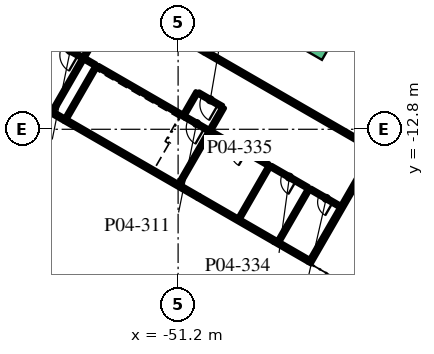
"""IFC4 building model, lengths in metres.
Left out: names, types, materials, properties, quantities, classifications, styles, units other than length and angle.
Written with IfcOpenShell. Run it as: python <this file> out.ifc"""

import sys

from ifc_helpers import new_model, si_unit, direction, frame, frame_2d, origin, place, context, subcontext, project, spatial, rectangle, extrude, element, fill, save


model = new_model("IFC4")
c1 = context("Model", 3, precision=1e-05, world=origin(), true_north=direction((0.0, 1.0)))
c2 = subcontext(c1, "Body", "Model", "MODEL_VIEW")
j1 = project(units=[si_unit("LENGTHUNIT", "METRE"), si_unit("PLANEANGLEUNIT", "RADIAN")], contexts=[c1])
p1 = place(None, origin())
s1 = spatial("IfcSite", under=j1, at=p1, CompositionType="ELEMENT")
p2 = place(p1, origin())
s2 = spatial("IfcBuilding", under=s1, at=p2, CompositionType="ELEMENT")
p3 = place(p2, frame((0.0, 0.0, 21.6)))
s3 = spatial("IfcBuildingStorey", under=s2, at=p3, CompositionType="ELEMENT", Elevation=21.6)
p4 = place(p3, frame((-38.25, -14.145, 0.0), z_axis=(0.0, 0.0, 1.0), x_axis=(-0.499999331568, -0.866025789703, 0.0)))
e1 = element("IfcWall", 1, at=p4, inside=s3, PredefinedType="SOLIDWALL", context=c2, shape_type="SweptSolid", body=[
    extrude(rectangle(XDim=8.625, YDim=0.25, at=frame_2d((4.312, 0.0))), origin(), (0.0, 0.0, 1.0), 4.5),
])
p5 = place(p3, frame((-38.358, -14.083, 0.0), z_axis=(0.0, 0.0, 1.0), x_axis=(-0.866025499775, 0.499999833739, 0.0)))
e2 = element("IfcWall", 2, at=p5, inside=s3, PredefinedType="SOLIDWALL", context=c2, shape_type="SweptSolid", body=[
    extrude(rectangle(XDim=12.8, YDim=0.25, at=frame_2d((6.4, 0.0))), origin(), (0.0, 0.0, 1.0), 4.5),
])
p6 = place(p3, frame((-51.782, -6.333, 0.0), z_axis=(0.0, 0.0, 1.0), x_axis=(0.866019956843, -0.50000943426, 0.0)))
e3 = element("IfcWall", 3, at=p6, inside=s3, PredefinedType="SOLIDWALL", context=c2, shape_type="SweptSolid", body=[
    extrude(rectangle(XDim=2.7, YDim=0.25, at=frame_2d((1.35, 0.0))), origin(), (0.0, 0.0, 1.0), 4.5),
])
p7 = place(p6, frame((0.25, 0.0, 0.0)))
e4 = element("IfcOpeningElement", 4, at=p7, cuts=e3, PredefinedType="OPENING", context=c2, shape_type="SweptSolid", body=[
    extrude(rectangle(XDim=2.2, YDim=2.1, at=frame_2d((1.1, 1.05))), frame((0.0, 0.135, 0.0), z_axis=(0.0, -1.0, 0.0), x_axis=(1.0, 0.0, 0.0)), (0.0, 0.0, 1.0), 0.27),
])
p8 = place(p3, frame((-42.608, -21.444, 0.0), z_axis=(0.0, 0.0, 1.0), x_axis=(-0.866021400173, 0.500006934395, 0.0)))
e5 = element("IfcWall", 5, at=p8, inside=s3, PredefinedType="SOLIDWALL", context=c2, shape_type="SweptSolid", body=[
    extrude(rectangle(XDim=2.6, YDim=0.25, at=frame_2d((1.3, 0.0))), origin(), (0.0, 0.0, 1.0), 4.5),
])
p9 = place(p3, frame((-44.86, -20.144, 0.0), z_axis=(0.0, 0.0, 1.0), x_axis=(-0.866025774745, 0.499999357477, 0.0)))
e6 = element("IfcWall", 6, at=p9, inside=s3, PredefinedType="SOLIDWALL", context=c2, shape_type="SweptSolid", body=[
    extrude(rectangle(XDim=5.775, YDim=0.25, at=frame_2d((2.887, 0.0))), origin(), (0.0, 0.0, 1.0), 4.5),
])
p10 = place(p9, frame((0.25, 0.0, 0.9)))
e7 = element("IfcOpeningElement", 7, at=p10, cuts=e6, PredefinedType="OPENING", context=c2, shape_type="SweptSolid", body=[
    extrude(rectangle(XDim=2.0, YDim=1.8, at=frame_2d((1.0, 0.9))), frame((0.0, 0.135, 0.0), z_axis=(0.0, -1.0, 0.0), x_axis=(1.0, 0.0, 0.0)), (0.0, 0.0, 1.0), 0.27),
])
p11 = place(p9, frame((3.525, 0.0, 0.9)))
e8 = element("IfcOpeningElement", 8, at=p11, cuts=e6, PredefinedType="OPENING", context=c2, shape_type="SweptSolid", body=[
    extrude(rectangle(XDim=2.0, YDim=1.8, at=frame_2d((1.0, 0.9))), frame((0.0, 0.135, 0.0), z_axis=(0.0, -1.0, 0.0), x_axis=(1.0, 0.0, 0.0)), (0.0, 0.0, 1.0), 0.27),
])
p12 = place(p3, frame((-49.861, -17.256, 0.0), z_axis=(0.0, 0.0, 1.0), x_axis=(-0.866026575979, 0.499997969693, 0.0)))
e9 = element("IfcWall", 9, at=p12, inside=s3, PredefinedType="SOLIDWALL", context=c2, shape_type="SweptSolid", body=[
    extrude(rectangle(XDim=10.125, YDim=0.25, at=frame_2d((5.062, 0.0))), origin(), (0.0, 0.0, 1.0), 4.5),
])
p13 = place(p3, frame((-59.496, -11.694, 0.0), z_axis=(0.0, 0.0, 1.0), x_axis=(-0.866021068297, 0.500007509209, 0.0)))
e10 = element("IfcWall", 10, at=p13, inside=s3, PredefinedType="SOLIDWALL", context=c2, shape_type="SweptSolid", body=[
    extrude(rectangle(XDim=8.6, YDim=0.25, at=frame_2d((4.3, 0.0))), origin(), (0.0, 0.0, 1.0), 4.5),
])
p14 = place(p3, frame((-58.63, -12.194, 0.0), z_axis=(0.0, 0.0, 1.0), x_axis=(-0.866010750942, 0.50002537861, 0.0)))
e11 = element("IfcWall", 11, at=p14, inside=s3, PredefinedType="SOLIDWALL", context=c2, shape_type="SweptSolid", body=[
    extrude(rectangle(XDim=1.0, YDim=0.25, at=frame_2d((0.5, 0.0))), origin(), (0.0, 0.0, 1.0), 4.5),
])
for number, where, z_axis, x_axis in (
    (12, (-49.119, -12.921, 0.0), (0.0, 0.0, 1.0), (-0.5, -0.866, 0.0)),
    (13, (-56.567, -8.621, 0.0), (0.0, 0.0, 1.0), (-0.5, -0.866, 0.0)),
    (14, (-57.433, -8.121, 0.0), (0.0, 0.0, 1.0), (-0.5, -0.866, 0.0)),
):
    element("IfcWall", number, at=place(p3, frame(where, z_axis=z_axis, x_axis=x_axis)), inside=s3, PredefinedType="SOLIDWALL", context=c2, shape_type="SweptSolid", body=[
        extrude(rectangle(XDim=4.0, YDim=0.2, at=frame_2d((2.0, 0.0))), origin(), (0.0, 0.0, 1.0), 4.5),
    ])
p15 = place(p3, frame((-49.206, -12.871, 0.0), z_axis=(0.0, 0.0, 1.0), x_axis=(-0.866036909293, 0.499980071345, 0.0)))
e15 = element("IfcWall", 15, at=p15, inside=s3, PredefinedType="SOLIDWALL", context=c2, shape_type="SweptSolid", body=[
    extrude(rectangle(XDim=1.75, YDim=0.2, at=frame_2d((0.875, 0.0))), origin(), (0.0, 0.0, 1.0), 4.5),
])
p16 = place(p15, frame((0.3, 0.0, 0.0)))
e16 = element("IfcOpeningElement", 16, at=p16, cuts=e15, PredefinedType="OPENING", context=c2, shape_type="SweptSolid", body=[
    extrude(rectangle(XDim=1.2, YDim=2.1, at=frame_2d((0.6, 1.05))), frame((0.0, 0.11, 0.0), z_axis=(0.0, -1.0, 0.0), x_axis=(1.0, 0.0, 0.0)), (0.0, 0.0, 1.0), 0.22),
])
p17 = place(p3, frame((-50.722, -11.996, 0.0), z_axis=(0.0, 0.0, 1.0), x_axis=(-0.866027239912, 0.49999681972, 0.0)))
e17 = element("IfcWall", 17, at=p17, inside=s3, PredefinedType="SOLIDWALL", context=c2, shape_type="SweptSolid", body=[
    extrude(rectangle(XDim=6.65, YDim=0.2, at=frame_2d((3.325, 0.0))), origin(), (0.0, 0.0, 1.0), 4.5),
])
p18 = place(p3, frame((-57.52, -8.071, 0.0), z_axis=(0.0, 0.0, 1.0), x_axis=(-0.866002029911, 0.500040482552, 0.0)))
e18 = element("IfcWall", 18, at=p18, inside=s3, PredefinedType="SOLIDWALL", context=c2, shape_type="SweptSolid", body=[
    extrude(rectangle(XDim=1.75, YDim=0.2, at=frame_2d((0.875, 0.0))), origin(), (0.0, 0.0, 1.0), 4.5),
])
p19 = place(p18, frame((0.3, 0.0, 0.0)))
e19 = element("IfcOpeningElement", 19, at=p19, cuts=e18, PredefinedType="OPENING", context=c2, shape_type="SweptSolid", body=[
    extrude(rectangle(XDim=1.2, YDim=2.1, at=frame_2d((0.6, 1.05))), frame((0.0, 0.11, 0.0), z_axis=(0.0, -1.0, 0.0), x_axis=(1.0, 0.0, 0.0)), (0.0, 0.0, 1.0), 0.22),
])
for number, where, z_axis, x_axis in (
    (20, (-48.219, -11.363, 0.0), (0.0, 0.0, 1.0), (-0.5, -0.866, 0.0)),
    (21, (-49.951, -10.363, 0.0), (0.0, 0.0, 1.0), (-0.5, -0.866, 0.0)),
):
    element("IfcWall", number, at=place(p3, frame(where, z_axis=z_axis, x_axis=x_axis)), inside=s3, PredefinedType="PARTITIONING", context=c2, shape_type="SweptSolid", body=[
        extrude(rectangle(XDim=1.7, YDim=0.2, at=frame_2d((0.85, 0.0))), origin(), (0.0, 0.0, 1.0), 4.5),
    ])
p20 = place(p3, frame((-56.533, -6.562, 0.0), z_axis=(0.0, 0.0, 1.0), x_axis=(-0.500000056704, -0.866025371046, 0.0)))
e22 = element("IfcWall", 22, at=p20, inside=s3, PredefinedType="PARTITIONING", context=c2, shape_type="SweptSolid", body=[
    extrude(rectangle(XDim=1.7, YDim=0.2, at=frame_2d((0.85, 0.0))), origin(), (0.0, 0.0, 1.0), 4.5),
])
p21 = place(p3, frame((-48.306, -11.312, 0.0), z_axis=(0.0, 0.0, 1.0), x_axis=(-0.866047807691, 0.499961193289, 0.0)))
e23 = element("IfcWall", 23, at=p21, inside=s3, PredefinedType="PARTITIONING", context=c2, shape_type="SweptSolid", body=[
    extrude(rectangle(XDim=1.8, YDim=0.2, at=frame_2d((0.9, 0.0))), origin(), (0.0, 0.0, 1.0), 4.5),
])
p22 = place(p21, frame((0.3, 0.0, 0.0)))
e24 = element("IfcOpeningElement", 24, at=p22, cuts=e23, PredefinedType="OPENING", context=c2, shape_type="SweptSolid", body=[
    extrude(rectangle(XDim=1.2, YDim=2.1, at=frame_2d((0.6, 1.05))), frame((0.0, 0.11, 0.0), z_axis=(0.0, -1.0, 0.0), x_axis=(1.0, 0.0, 0.0)), (0.0, 0.0, 1.0), 0.22),
])
p23 = place(p3, frame((-42.581, -16.696, 0.0), z_axis=(0.0, 0.0, 1.0), x_axis=(-0.49999894854, -0.866026010844, 0.0)))
e25 = element("IfcWall", 25, at=p23, inside=s3, PredefinedType="PARTITIONING", context=c2, shape_type="SweptSolid", body=[
    extrude(rectangle(XDim=4.0, YDim=0.2, at=frame_2d((2.0, 0.0))), origin(), (0.0, 0.0, 1.0), 4.5),
])
p24 = place(p3, frame((-40.546, -17.871, 0.0), z_axis=(0.0, 0.0, 1.0), x_axis=(-0.866017533419, 0.500013631625, 0.0)))
e26 = element("IfcWall", 26, at=p24, inside=s3, PredefinedType="PARTITIONING", context=c2, shape_type="SweptSolid", body=[
    extrude(rectangle(XDim=2.25, YDim=0.2, at=frame_2d((1.125, 0.0))), origin(), (0.0, 0.0, 1.0), 4.5),
])
p25 = place(p24, frame((0.55, 0.0, 0.0)))
e27 = element("IfcOpeningElement", 27, at=p25, cuts=e26, PredefinedType="OPENING", context=c2, shape_type="SweptSolid", body=[
    extrude(rectangle(XDim=1.0, YDim=2.1, at=frame_2d((0.5, 1.05))), frame((0.0, 0.11, 0.0), z_axis=(0.0, -1.0, 0.0), x_axis=(1.0, 0.0, 0.0)), (0.0, 0.0, 1.0), 0.22),
])
p26 = place(p3, frame((-45.179, -15.196, 0.0), z_axis=(0.0, 0.0, 1.0), x_axis=(-0.49999894854, -0.866026010844, 0.0)))
e28 = element("IfcWall", 28, at=p26, inside=s3, PredefinedType="PARTITIONING", context=c2, shape_type="SweptSolid", body=[
    extrude(rectangle(XDim=4.0, YDim=0.2, at=frame_2d((2.0, 0.0))), origin(), (0.0, 0.0, 1.0), 4.5),
])
p27 = place(p3, frame((-42.667, -16.646, 0.0), z_axis=(0.0, 0.0, 1.0), x_axis=(-0.865996816683, 0.500049511043, 0.0)))
e29 = element("IfcWall", 29, at=p27, inside=s3, PredefinedType="PARTITIONING", context=c2, shape_type="SweptSolid", body=[
    extrude(rectangle(XDim=2.8, YDim=0.2, at=frame_2d((1.4, 0.0))), origin(), (0.0, 0.0, 1.0), 4.5),
])
p28 = place(p27, frame((0.9, 0.0, 0.0)))
e30 = element("IfcOpeningElement", 30, at=p28, cuts=e29, PredefinedType="OPENING", context=c2, shape_type="SweptSolid", body=[
    extrude(rectangle(XDim=1.0, YDim=2.1, at=frame_2d((0.5, 1.05))), frame((0.0, 0.11, 0.0), z_axis=(0.0, -1.0, 0.0), x_axis=(1.0, 0.0, 0.0)), (0.0, 0.0, 1.0), 0.22),
])
p29 = place(p3, frame((-45.266, -15.146, 0.0), z_axis=(0.0, 0.0, 1.0), x_axis=(-0.865988727248, 0.500063520245, 0.0)))
e31 = element("IfcWall", 31, at=p29, inside=s3, PredefinedType="PARTITIONING", context=c2, shape_type="SweptSolid", body=[
    extrude(rectangle(XDim=1.425, YDim=0.2, at=frame_2d((0.712, 0.0))), origin(), (0.0, 0.0, 1.0), 4.5),
])
p30 = place(p3, frame((-46.5, -14.434, 0.0), z_axis=(0.0, 0.0, 1.0), x_axis=(-0.866031096941, 0.499990139034, 0.0)))
e32 = element("IfcWall", 32, at=p30, inside=s3, PredefinedType="PARTITIONING", context=c2, shape_type="SweptSolid", body=[
    extrude(rectangle(XDim=1.5, YDim=0.2, at=frame_2d((0.75, 0.0))), origin(), (0.0, 0.0, 1.0), 4.5),
])
p31 = place(p30, frame((0.25, 0.0, 0.0)))
e33 = element("IfcOpeningElement", 33, at=p31, cuts=e32, PredefinedType="OPENING", context=c2, shape_type="SweptSolid", body=[
    extrude(rectangle(XDim=1.0, YDim=2.1, at=frame_2d((0.5, 1.05))), frame((0.0, 0.11, 0.0), z_axis=(0.0, -1.0, 0.0), x_axis=(1.0, 0.0, 0.0)), (0.0, 0.0, 1.0), 0.22),
])
p32 = place(p3, frame((-47.799, -13.684, 0.0), z_axis=(0.0, 0.0, 1.0), x_axis=(-0.866062911188, 0.499935029643, 0.0)))
e34 = element("IfcWall", 34, at=p32, inside=s3, PredefinedType="PARTITIONING", context=c2, shape_type="SweptSolid", body=[
    extrude(rectangle(XDim=1.425, YDim=0.2, at=frame_2d((0.712, 0.0))), origin(), (0.0, 0.0, 1.0), 4.5),
])
p33 = place(p3, frame((-56.654, -8.571, 0.0), z_axis=(0.0, 0.0, 1.0), x_axis=(-0.866094119867, 0.499880961361, 0.0)))
e35 = element("IfcWall", 35, at=p33, inside=s3, PredefinedType="PARTITIONING", context=c2, shape_type="SweptSolid", body=[
    extrude(rectangle(XDim=0.8, YDim=0.2, at=frame_2d((0.4, 0.0))), origin(), (0.0, 0.0, 1.0), 4.5),
])
p34 = place(p3, frame((-36.343, 2.508, 0.0), z_axis=(0.0, 0.0, 1.0), x_axis=(-0.49999894854, -0.866026010844, 0.0)))
e36 = element("IfcWall", 36, at=p34, inside=s3, PredefinedType="SOLIDWALL", context=c2, shape_type="SweptSolid", body=[
    extrude(rectangle(XDim=12.0, YDim=1.4, at=frame_2d((6.0, 0.0))), origin(), (0.0, 0.0, 1.0), 0.9),
])
p35 = place(p10, origin())
e37 = element("IfcWindow", 37, at=p35, inside=s3, PartitioningType="SINGLE_PANEL", PredefinedType="WINDOW", context=c2, shape_type="SweptSolid", body=[
    extrude(rectangle(XDim=2.0, YDim=1.8, at=frame_2d((1.0, 0.9))), frame((0.0, 0.03, 0.0), z_axis=(0.0, -1.0, 0.0), x_axis=(1.0, 0.0, 0.0)), (0.0, 0.0, 1.0), 0.06),
])
fill(e7, e37)
p36 = place(p11, origin())
e38 = element("IfcWindow", 38, at=p36, inside=s3, PartitioningType="SINGLE_PANEL", PredefinedType="WINDOW", context=c2, shape_type="SweptSolid", body=[
    extrude(rectangle(XDim=2.0, YDim=1.8, at=frame_2d((1.0, 0.9))), frame((0.0, 0.03, 0.0), z_axis=(0.0, -1.0, 0.0), x_axis=(1.0, 0.0, 0.0)), (0.0, 0.0, 1.0), 0.06),
])
fill(e8, e38)
p37 = place(p16, origin())
e39 = element("IfcDoor", 39, at=p37, inside=s3, OperationType="SINGLE_SWING_LEFT", PredefinedType="DOOR", context=c2, shape_type="SweptSolid", body=[
    extrude(rectangle(XDim=1.2, YDim=2.1, at=frame_2d((0.6, 1.05))), frame((0.0, 0.025, 0.0), z_axis=(0.0, -1.0, 0.0), x_axis=(1.0, 0.0, 0.0)), (0.0, 0.0, 1.0), 0.05),
])
fill(e16, e39)
p38 = place(p19, origin())
e40 = element("IfcDoor", 40, at=p38, inside=s3, OperationType="SINGLE_SWING_LEFT", PredefinedType="DOOR", context=c2, shape_type="SweptSolid", body=[
    extrude(rectangle(XDim=1.2, YDim=2.1, at=frame_2d((0.6, 1.05))), frame((0.0, 0.025, 0.0), z_axis=(0.0, -1.0, 0.0), x_axis=(1.0, 0.0, 0.0)), (0.0, 0.0, 1.0), 0.05),
])
fill(e19, e40)
p39 = place(p22, origin())
e41 = element("IfcDoor", 41, at=p39, inside=s3, OperationType="SINGLE_SWING_LEFT", PredefinedType="DOOR", context=c2, shape_type="SweptSolid", body=[
    extrude(rectangle(XDim=1.2, YDim=2.1, at=frame_2d((0.6, 1.05))), frame((0.0, 0.025, 0.0), z_axis=(0.0, -1.0, 0.0), x_axis=(1.0, 0.0, 0.0)), (0.0, 0.0, 1.0), 0.05),
])
fill(e24, e41)
p40 = place(p25, origin())
e42 = element("IfcDoor", 42, at=p40, inside=s3, OperationType="SINGLE_SWING_LEFT", PredefinedType="DOOR", context=c2, shape_type="SweptSolid", body=[
    extrude(rectangle(XDim=1.0, YDim=2.1, at=frame_2d((0.5, 1.05))), frame((0.0, 0.025, 0.0), z_axis=(0.0, -1.0, 0.0), x_axis=(1.0, 0.0, 0.0)), (0.0, 0.0, 1.0), 0.05),
])
fill(e27, e42)
p41 = place(p28, origin())
e43 = element("IfcDoor", 43, at=p41, inside=s3, OperationType="SINGLE_SWING_LEFT", PredefinedType="DOOR", context=c2, shape_type="SweptSolid", body=[
    extrude(rectangle(XDim=1.0, YDim=2.1, at=frame_2d((0.5, 1.05))), frame((0.0, 0.025, 0.0), z_axis=(0.0, -1.0, 0.0), x_axis=(1.0, 0.0, 0.0)), (0.0, 0.0, 1.0), 0.05),
])
fill(e30, e43)
p42 = place(p31, origin())
e44 = element("IfcDoor", 44, at=p42, inside=s3, OperationType="SINGLE_SWING_LEFT", PredefinedType="DOOR", context=c2, shape_type="SweptSolid", body=[
    extrude(rectangle(XDim=1.0, YDim=2.1, at=frame_2d((0.5, 1.05))), frame((0.0, 0.025, 0.0), z_axis=(0.0, -1.0, 0.0), x_axis=(1.0, 0.0, 0.0)), (0.0, 0.0, 1.0), 0.05),
])
fill(e33, e44)
save(model, sys.argv[1])
